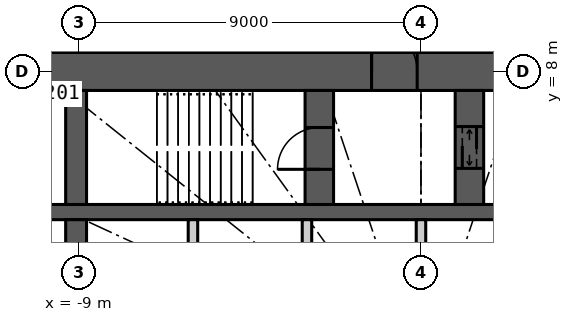
"""IFC4 building model, lengths in metres.
Left out: names, types, materials, properties, quantities, classifications, styles, units other than length and angle.
Written with IfcOpenShell. Run it as: python <this file> out.ifc"""

import sys

from ifc_helpers import new_model, si_unit, direction, frame, frame_2d, origin, place, context, subcontext, project, spatial, rectangle, extrude, element, fill, save


model = new_model("IFC4")
c1 = context("Model", 3, precision=1e-05, world=origin(), true_north=direction((0.0, 1.0)))
c2 = subcontext(c1, "Body", "Model", "MODEL_VIEW")
j1 = project(units=[si_unit("LENGTHUNIT", "METRE"), si_unit("PLANEANGLEUNIT", "RADIAN")], contexts=[c1])
p1 = place(None, origin())
s1 = spatial("IfcSite", under=j1, at=p1, CompositionType="ELEMENT")
p2 = place(p1, origin())
s2 = spatial("IfcBuilding", under=s1, at=p2, CompositionType="ELEMENT")
p3 = place(p2, frame((0.0, 0.0, -6.0)))
s3 = spatial("IfcBuildingStorey", under=s2, at=p3, CompositionType="ELEMENT", Elevation=-6.0)
p4 = place(p3, frame((-12.5, 8.0, 0.0), z_axis=(0.0, 0.0, 1.0), x_axis=(1.0, 0.0, 0.0)))
e1 = element("IfcWall", 1, at=p4, inside=s3, PredefinedType="SHEAR", context=c2, shape_type="SweptSolid", body=[
    extrude(rectangle(XDim=25.0, YDim=1.0, at=frame_2d((12.5, 0.0))), origin(), (0.0, 0.0, 1.0), 6.0),
])
p5 = place(p4, frame((11.2, 0.0, 0.0)))
e2 = element("IfcOpeningElement", 2, at=p5, cuts=e1, PredefinedType="OPENING", context=c2, shape_type="SweptSolid", body=[
    extrude(rectangle(XDim=1.2, YDim=2.2, at=frame_2d((0.6, 1.1))), frame((0.0, 0.51, 0.0), z_axis=(0.0, -1.0, 0.0), x_axis=(1.0, 0.0, 0.0)), (0.0, 0.0, 1.0), 1.02),
])
p6 = place(p4, frame((18.8, 0.0, 0.0)))
e3 = element("IfcOpeningElement", 3, at=p6, cuts=e1, PredefinedType="OPENING", context=c2, shape_type="SweptSolid", body=[
    extrude(rectangle(XDim=0.9, YDim=2.2, at=frame_2d((0.45, 1.1))), frame((0.0, 0.51, 0.0), z_axis=(0.0, -1.0, 0.0), x_axis=(1.0, 0.0, 0.0)), (0.0, 0.0, 1.0), 1.02),
])
p7 = place(p3, frame((-11.5, 4.3, 0.0), z_axis=(0.0, 0.0, 1.0), x_axis=(1.0, 0.0, 0.0)))
e4 = element("IfcWall", 4, at=p7, inside=s3, PredefinedType="SHEAR", context=c2, shape_type="SweptSolid", body=[
    extrude(rectangle(XDim=23.0, YDim=0.4, at=frame_2d((11.5, 0.0))), origin(), (0.0, 0.0, 1.0), 6.0),
])
p8 = place(p3, frame((-9.075, 4.5, 0.0), z_axis=(0.0, 0.0, 1.0), x_axis=(0.0, 1.0, 0.0)))
e5 = element("IfcWall", 5, at=p8, inside=s3, PredefinedType="SHEAR", context=c2, shape_type="SweptSolid", body=[
    extrude(rectangle(XDim=3.0, YDim=0.55, at=frame_2d((1.5, 0.0))), origin(), (0.0, 0.0, 1.0), 6.0),
])
p9 = place(p3, frame((-9.075, 1.75, 0.0), z_axis=(0.0, 0.0, 1.0), x_axis=(0.0, 1.0, 0.0)))
e6 = element("IfcWall", 6, at=p9, inside=s3, PredefinedType="SHEAR", context=c2, shape_type="SweptSolid", body=[
    extrude(rectangle(XDim=2.35, YDim=0.55, at=frame_2d((1.175, 0.0))), origin(), (0.0, 0.0, 1.0), 6.0),
])
p10 = place(p3, frame((-2.675, 4.5, 0.0), z_axis=(0.0, 0.0, 1.0), x_axis=(0.0, 1.0, 0.0)))
e7 = element("IfcWall", 7, at=p10, inside=s3, PredefinedType="SHEAR", context=c2, shape_type="SweptSolid", body=[
    extrude(rectangle(XDim=3.0, YDim=0.75, at=frame_2d((1.5, 0.0))), origin(), (0.0, 0.0, 1.0), 6.0),
])
p11 = place(p10, frame((0.925, 0.0, 0.0)))
e8 = element("IfcOpeningElement", 8, at=p11, cuts=e7, PredefinedType="OPENING", context=c2, shape_type="SweptSolid", body=[
    extrude(rectangle(XDim=1.1, YDim=2.2, at=frame_2d((0.55, 1.1))), frame((0.0, 0.385, 0.0), z_axis=(0.0, -1.0, 0.0), x_axis=(1.0, 0.0, 0.0)), (0.0, 0.0, 1.0), 0.77),
])
p12 = place(p3, frame((1.275, 4.5, 0.0), z_axis=(0.0, 0.0, 1.0), x_axis=(0.0, 1.0, 0.0)))
e9 = element("IfcWall", 9, at=p12, inside=s3, PredefinedType="SHEAR", context=c2, shape_type="SweptSolid", body=[
    extrude(rectangle(XDim=3.0, YDim=0.75, at=frame_2d((1.5, 0.0))), origin(), (0.0, 0.0, 1.0), 6.0),
])
p13 = place(p12, frame((0.95, 0.0, 0.0)))
e10 = element("IfcOpeningElement", 10, at=p13, cuts=e9, PredefinedType="OPENING", context=c2, shape_type="SweptSolid", body=[
    extrude(rectangle(XDim=1.1, YDim=2.2, at=frame_2d((0.55, 1.1))), frame((0.0, 0.385, 0.0), z_axis=(0.0, -1.0, 0.0), x_axis=(1.0, 0.0, 0.0)), (0.0, 0.0, 1.0), 0.77),
])
for number, where, z_axis, x_axis in (
    (11, (-6.0, 1.75, 0.0), (0.0, 0.0, 1.0), (0.0, 1.0, 0.0)),
    (12, (-3.0, 1.75, 0.0), (0.0, 0.0, 1.0), (0.0, 1.0, 0.0)),
    (13, (0.0, 1.75, 0.0), (0.0, 0.0, 1.0), (0.0, 1.0, 0.0)),
):
    element("IfcWall", number, at=place(p3, frame(where, z_axis=z_axis, x_axis=x_axis)), inside=s3, PredefinedType="PARTITIONING", context=c2, shape_type="SweptSolid", body=[
        extrude(rectangle(XDim=2.35, YDim=0.25, at=frame_2d((1.175, 0.0))), origin(), (0.0, 0.0, 1.0), 6.0),
    ])
p14 = place(p5, origin())
e14 = element("IfcDoor", 14, at=p14, inside=s3, OperationType="SINGLE_SWING_LEFT", PredefinedType="DOOR", context=c2, shape_type="SweptSolid", body=[
    extrude(rectangle(XDim=1.2, YDim=2.2, at=frame_2d((0.6, 1.1))), frame((0.0, 0.025, 0.0), z_axis=(0.0, -1.0, 0.0), x_axis=(1.0, 0.0, 0.0)), (0.0, 0.0, 1.0), 0.05),
])
fill(e2, e14)
p15 = place(p11, origin())
e15 = element("IfcDoor", 15, at=p15, inside=s3, OperationType="SINGLE_SWING_LEFT", PredefinedType="DOOR", context=c2, shape_type="SweptSolid", body=[
    extrude(rectangle(XDim=1.1, YDim=2.2, at=frame_2d((0.55, 1.1))), frame((0.0, 0.025, 0.0), z_axis=(0.0, -1.0, 0.0), x_axis=(1.0, 0.0, 0.0)), (0.0, 0.0, 1.0), 0.05),
])
fill(e8, e15)
p16 = place(p13, origin())
e16 = element("IfcDoor", 16, at=p16, inside=s3, OperationType="DOUBLE_DOOR_SLIDING", PredefinedType="DOOR", context=c2, shape_type="SweptSolid", body=[
    extrude(rectangle(XDim=1.1, YDim=2.2, at=frame_2d((0.55, 1.1))), frame((0.0, 0.025, 0.0), z_axis=(0.0, -1.0, 0.0), x_axis=(1.0, 0.0, 0.0)), (0.0, 0.0, 1.0), 0.05),
])
fill(e10, e16)
save(model, sys.argv[1])
